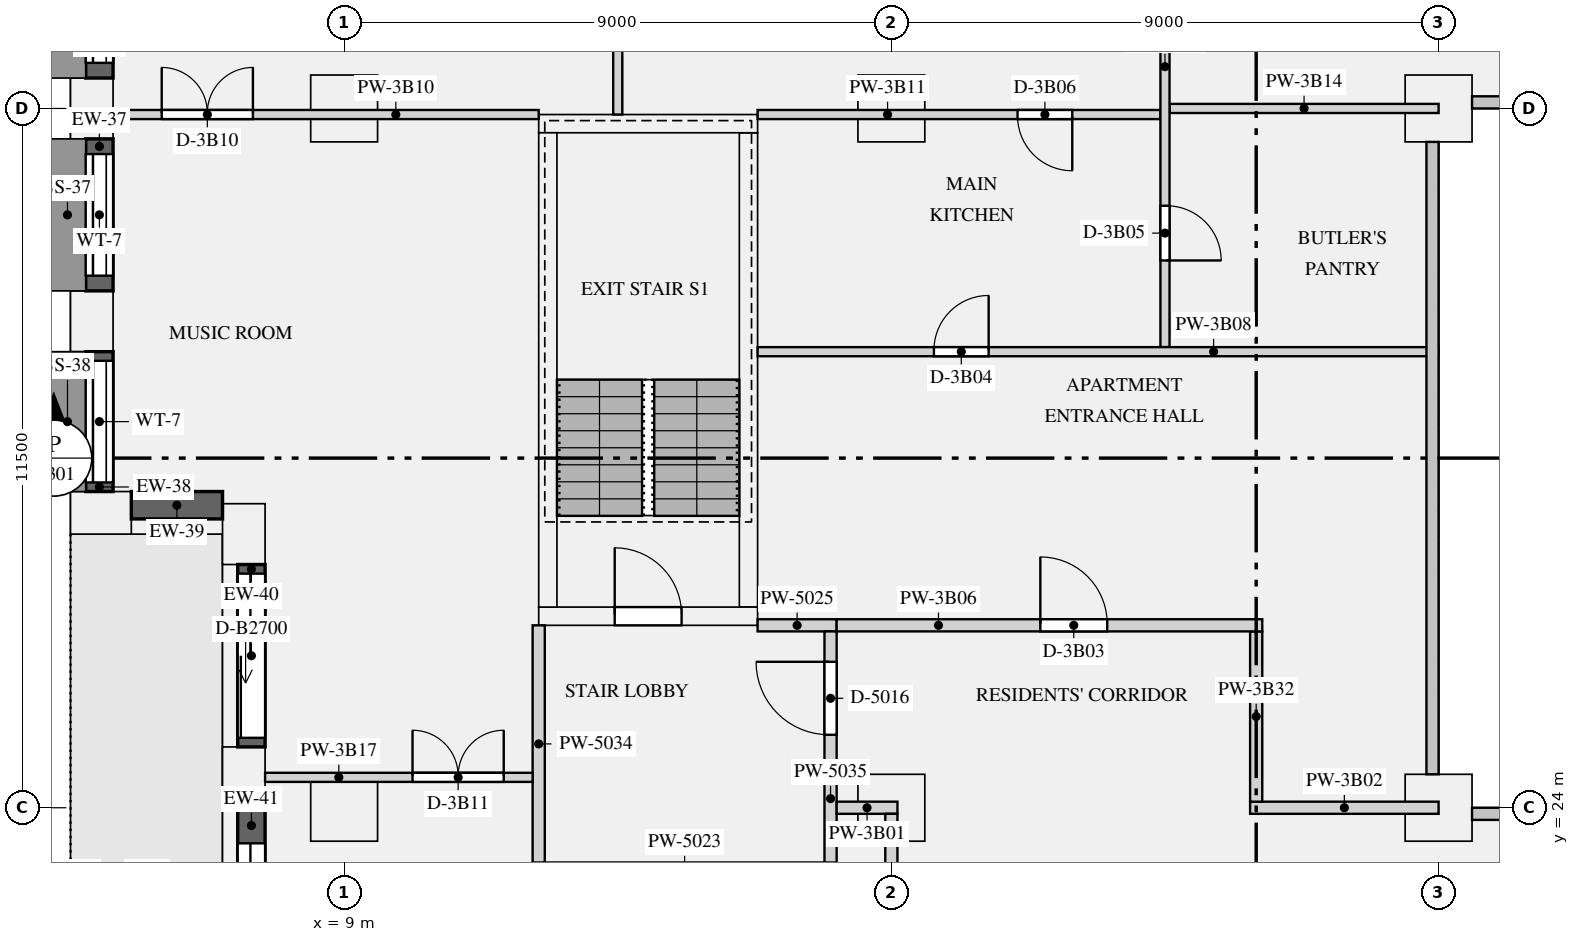
"""IFC4 building model, lengths in metres.
Left out: names, types, materials, properties, quantities, classifications, styles, units other than length and angle.
Written with IfcOpenShell. Run it as: python <this file> out.ifc"""

import sys

from ifc_helpers import new_model, si_unit, direction, frame, frame_2d, origin, origin_2d, place, context, subcontext, project, spatial, rectangle, extrude, element, fill, save


model = new_model("IFC4")
c1 = context("Model", 3, precision=1e-05, world=origin(), true_north=direction((0.0, 1.0)))
c2 = subcontext(c1, "Body", "Model", "MODEL_VIEW")
j1 = project(units=[si_unit("LENGTHUNIT", "METRE"), si_unit("PLANEANGLEUNIT", "RADIAN")], contexts=[c1])
p1 = place(None, origin())
s1 = spatial("IfcSite", under=j1, at=p1, CompositionType="ELEMENT")
p2 = place(p1, origin())
s2 = spatial("IfcBuilding", under=s1, at=p2, CompositionType="ELEMENT")
p3 = place(p2, frame((0.0, 0.0, 150.75)))
s3 = spatial("IfcBuildingStorey", under=s2, at=p3, CompositionType="ELEMENT", Elevation=150.75)
for number, where, z_axis, x_axis in (
    (1, (4.85, 35.5, 0.0), (0.0, 0.0, 1.0), (0.0, -1.0, 0.0)),
    (2, (4.85, 32.0, 0.0), (0.0, 0.0, 1.0), (0.0, -1.0, 0.0)),
    (3, (5.0, 28.85, 0.0), (0.0, 0.0, 1.0), (1.0, 0.0, 0.0)),
    (4, (7.35, 28.5, 0.0), (0.0, 0.0, 1.0), (0.0, -1.0, 0.0)),
    (5, (7.35, 24.5, 0.0), (0.0, 0.0, 1.0), (0.0, -1.0, 0.0)),
):
    element("IfcColumn", number, at=place(p3, frame(where, z_axis=z_axis, x_axis=x_axis)), inside=s3, PredefinedType="USERDEFINED", context=c2, shape_type="SweptSolid", body=[
        extrude(rectangle(XDim=1.0, YDim=0.7, at=origin_2d()), origin(), (0.0, 0.0, 1.0), 3.15),
    ])
for number, where, z_axis, x_axis in (
    (6, (9.0, 24.0, 0.0), (0.0, 0.0, 1.0), (1.0, 0.0, 0.0)),
    (7, (18.0, 24.0, 0.0), (0.0, 0.0, 1.0), (1.0, 0.0, 0.0)),
    (8, (27.0, 24.0, 0.0), (0.0, 0.0, 1.0), (1.0, 0.0, 0.0)),
    (9, (9.0, 35.5, 0.0), (0.0, 0.0, 1.0), (1.0, 0.0, 0.0)),
    (10, (18.0, 35.5, 0.0), (0.0, 0.0, 1.0), (1.0, 0.0, 0.0)),
    (11, (27.0, 35.5, 0.0), (0.0, 0.0, 1.0), (1.0, 0.0, 0.0)),
):
    element("IfcColumn", number, at=place(p3, frame(where, z_axis=z_axis, x_axis=x_axis)), inside=s3, PredefinedType="COLUMN", context=c2, shape_type="SweptSolid", body=[
        extrude(rectangle(XDim=1.1, YDim=1.1, at=origin_2d()), origin(), (0.0, 0.0, 1.0), 3.15),
    ])
p4 = place(p3, frame((12.2, 27.15, 0.0), z_axis=(0.0, 0.0, 1.0), x_axis=(1.0, 0.0, 0.0)))
e12 = element("IfcWall", 12, at=p4, inside=s3, PredefinedType="SHEAR", context=c2, shape_type="SweptSolid", body=[
    extrude(rectangle(XDim=3.6, YDim=0.3, at=frame_2d((1.8, 0.0))), origin(), (0.0, 0.0, 1.0), 3.15),
])
p5 = place(p4, frame((1.25, 0.0, 0.0)))
e13 = element("IfcOpeningElement", 13, at=p5, cuts=e12, PredefinedType="OPENING", context=c2, shape_type="SweptSolid", body=[
    extrude(rectangle(XDim=1.1, YDim=2.1, at=frame_2d((0.55, 1.05))), frame((0.0, 0.16, 0.0), z_axis=(0.0, -1.0, 0.0), x_axis=(1.0, 0.0, 0.0)), (0.0, 0.0, 1.0), 0.32),
])
p6 = place(p3, frame((12.2, 35.25, 0.0), z_axis=(0.0, 0.0, 1.0), x_axis=(1.0, 0.0, 0.0)))
e14 = element("IfcWall", 14, at=p6, inside=s3, PredefinedType="SHEAR", context=c2, shape_type="SweptSolid", body=[
    extrude(rectangle(XDim=3.6, YDim=0.3, at=frame_2d((1.8, 0.0))), origin(), (0.0, 0.0, 1.0), 3.15),
])
for number, where, z_axis, x_axis in (
    (15, (12.35, 27.3, 0.0), (0.0, 0.0, 1.0), (0.0, 1.0, 0.0)),
    (16, (15.65, 27.3, 0.0), (0.0, 0.0, 1.0), (0.0, 1.0, 0.0)),
):
    element("IfcWall", number, at=place(p3, frame(where, z_axis=z_axis, x_axis=x_axis)), inside=s3, PredefinedType="SHEAR", context=c2, shape_type="SweptSolid", body=[
        extrude(rectangle(XDim=7.8, YDim=0.3, at=frame_2d((3.9, 0.0))), origin(), (0.0, 0.0, 1.0), 3.15),
    ])
p7 = place(p3, frame((4.975, 38.0, 0.9), z_axis=(0.0, 0.0, 1.0), x_axis=(0.0, -1.0, 0.0)))
e17 = element("IfcWall", 17, at=p7, inside=s3, PredefinedType="SOLIDWALL", context=c2, shape_type="SweptSolid", body=[
    extrude(rectangle(XDim=2.0, YDim=0.45, at=frame_2d((1.0, 0.0))), origin(), (0.0, 0.0, 1.0), 1.93),
])
p8 = place(p7, frame((0.25, 0.0, 0.15)))
e18 = element("IfcOpeningElement", 18, at=p8, cuts=e17, PredefinedType="OPENING", context=c2, shape_type="SweptSolid", body=[
    extrude(rectangle(XDim=1.5, YDim=1.5, at=frame_2d((0.75, 0.75))), frame((0.0, 0.235, 0.0), z_axis=(0.0, -1.0, 0.0), x_axis=(1.0, 0.0, 0.0)), (0.0, 0.0, 1.0), 0.47),
])
p9 = place(p3, frame((4.975, 35.0, 0.9), z_axis=(0.0, 0.0, 1.0), x_axis=(0.0, -1.0, 0.0)))
e19 = element("IfcWall", 19, at=p9, inside=s3, PredefinedType="SOLIDWALL", context=c2, shape_type="SweptSolid", body=[
    extrude(rectangle(XDim=2.5, YDim=0.45, at=frame_2d((1.25, 0.0))), origin(), (0.0, 0.0, 1.0), 1.93),
])
p10 = place(p9, frame((0.25, 0.0, 0.15)))
e20 = element("IfcOpeningElement", 20, at=p10, cuts=e19, PredefinedType="OPENING", context=c2, shape_type="SweptSolid", body=[
    extrude(rectangle(XDim=2.0, YDim=1.5, at=frame_2d((1.0, 0.75))), frame((0.0, 0.235, 0.0), z_axis=(0.0, -1.0, 0.0), x_axis=(1.0, 0.0, 0.0)), (0.0, 0.0, 1.0), 0.47),
])
p11 = place(p3, frame((4.975, 31.5, 0.9), z_axis=(0.0, 0.0, 1.0), x_axis=(0.0, -1.0, 0.0)))
e21 = element("IfcWall", 21, at=p11, inside=s3, PredefinedType="SOLIDWALL", context=c2, shape_type="SweptSolid", body=[
    extrude(rectangle(XDim=2.3, YDim=0.45, at=frame_2d((1.15, 0.0))), origin(), (0.0, 0.0, 1.0), 1.93),
])
p12 = place(p11, frame((0.15, 0.0, 0.15)))
e22 = element("IfcOpeningElement", 22, at=p12, cuts=e21, PredefinedType="OPENING", context=c2, shape_type="SweptSolid", body=[
    extrude(rectangle(XDim=2.0, YDim=1.5, at=frame_2d((1.0, 0.75))), frame((0.0, 0.235, 0.0), z_axis=(0.0, -1.0, 0.0), x_axis=(1.0, 0.0, 0.0)), (0.0, 0.0, 1.0), 0.47),
])
p13 = place(p3, frame((5.5, 28.975, 0.9), z_axis=(0.0, 0.0, 1.0), x_axis=(1.0, 0.0, 0.0)))
e23 = element("IfcWall", 23, at=p13, inside=s3, PredefinedType="SOLIDWALL", context=c2, shape_type="SweptSolid", body=[
    extrude(rectangle(XDim=1.5, YDim=0.45, at=frame_2d((0.75, 0.0))), origin(), (0.0, 0.0, 1.0), 1.93),
])
p14 = place(p3, frame((7.475, 28.0, 0.0), z_axis=(0.0, 0.0, 1.0), x_axis=(0.0, -1.0, 0.0)))
e24 = element("IfcWall", 24, at=p14, inside=s3, PredefinedType="SOLIDWALL", context=c2, shape_type="SweptSolid", body=[
    extrude(rectangle(XDim=3.0, YDim=0.45, at=frame_2d((1.5, 0.0))), origin(), (0.0, 0.0, 1.0), 2.83),
])
p15 = place(p14, frame((0.15, 0.0, 0.0)))
e25 = element("IfcOpeningElement", 25, at=p15, cuts=e24, PredefinedType="OPENING", context=c2, shape_type="SweptSolid", body=[
    extrude(rectangle(XDim=2.7, YDim=2.3, at=frame_2d((1.35, 1.15))), frame((0.0, 0.235, 0.0), z_axis=(0.0, -1.0, 0.0), x_axis=(1.0, 0.0, 0.0)), (0.0, 0.0, 1.0), 0.47),
])
p16 = place(p3, frame((7.475, 24.0, 0.0), z_axis=(0.0, 0.0, 1.0), x_axis=(0.0, -1.0, 0.0)))
e26 = element("IfcWall", 26, at=p16, inside=s3, PredefinedType="SOLIDWALL", context=c2, shape_type="SweptSolid", body=[
    extrude(rectangle(XDim=3.0, YDim=0.45, at=frame_2d((1.5, 0.0))), origin(), (0.0, 0.0, 1.0), 2.83),
])
p17 = place(p16, frame((0.585, 0.0, 0.0)))
e27 = element("IfcOpeningElement", 27, at=p17, cuts=e26, PredefinedType="OPENING", context=c2, shape_type="SweptSolid", body=[
    extrude(rectangle(XDim=2.25, YDim=2.3, at=frame_2d((1.125, 1.15))), frame((0.0, 0.235, 0.0), z_axis=(0.0, -1.0, 0.0), x_axis=(1.0, 0.0, 0.0)), (0.0, 0.0, 1.0), 0.47),
])
p18 = place(p3, frame((15.8, 27.0, 0.0), z_axis=(0.0, 0.0, 1.0), x_axis=(1.0, 0.0, 0.0)))
e28 = element("IfcWall", 28, at=p18, inside=s3, PredefinedType="PARTITIONING", context=c2, shape_type="SweptSolid", body=[
    extrude(rectangle(XDim=1.3, YDim=0.2, at=frame_2d((0.65, 0.0))), origin(), (0.0, 0.0, 1.0), 2.83),
])
p19 = place(p3, frame((12.2, 23.1, 0.0), z_axis=(0.0, 0.0, 1.0), x_axis=(0.0, 1.0, 0.0)))
e29 = element("IfcWall", 29, at=p19, inside=s3, PredefinedType="PARTITIONING", context=c2, shape_type="SweptSolid", body=[
    extrude(rectangle(XDim=3.9, YDim=0.2, at=frame_2d((1.95, 0.0))), origin(), (0.0, 0.0, 1.0), 2.83),
])
p20 = place(p3, frame((17.0, 23.1, 0.0), z_axis=(0.0, 0.0, 1.0), x_axis=(0.0, 1.0, 0.0)))
e30 = element("IfcWall", 30, at=p20, inside=s3, PredefinedType="PARTITIONING", context=c2, shape_type="SweptSolid", body=[
    extrude(rectangle(XDim=3.8, YDim=0.2, at=frame_2d((1.9, 0.0))), origin(), (0.0, 0.0, 1.0), 2.83),
])
p21 = place(p20, frame((2.1, 0.0, 0.0)))
e31 = element("IfcOpeningElement", 31, at=p21, cuts=e30, PredefinedType="OPENING", context=c2, shape_type="SweptSolid", body=[
    extrude(rectangle(XDim=1.2, YDim=2.1, at=frame_2d((0.6, 1.05))), frame((0.0, 0.11, 0.0), z_axis=(0.0, -1.0, 0.0), x_axis=(1.0, 0.0, 0.0)), (0.0, 0.0, 1.0), 0.22),
])
p22 = place(p3, frame((17.1, 24.0, 0.0), z_axis=(0.0, 0.0, 1.0), x_axis=(1.0, 0.0, 0.0)))
e32 = element("IfcWall", 32, at=p22, inside=s3, PredefinedType="PARTITIONING", context=c2, shape_type="SweptSolid", body=[
    extrude(rectangle(XDim=1.0, YDim=0.2, at=frame_2d((0.5, 0.0))), origin(), (0.0, 0.0, 1.0), 2.83),
])
p23 = place(p3, frame((23.9, 24.0, 0.0), z_axis=(0.0, 0.0, 1.0), x_axis=(1.0, 0.0, 0.0)))
e33 = element("IfcWall", 33, at=p23, inside=s3, PredefinedType="PARTITIONING", context=c2, shape_type="SweptSolid", body=[
    extrude(rectangle(XDim=3.1, YDim=0.2, at=frame_2d((1.55, 0.0))), origin(), (0.0, 0.0, 1.0), 2.83),
])
p24 = place(p3, frame((17.1, 27.0, 0.0), z_axis=(0.0, 0.0, 1.0), x_axis=(1.0, 0.0, 0.0)))
e34 = element("IfcWall", 34, at=p24, inside=s3, PredefinedType="PARTITIONING", context=c2, shape_type="SweptSolid", body=[
    extrude(rectangle(XDim=7.0, YDim=0.2, at=frame_2d((3.5, 0.0))), origin(), (0.0, 0.0, 1.0), 2.83),
])
p25 = place(p24, frame((3.35, 0.0, 0.0)))
e35 = element("IfcOpeningElement", 35, at=p25, cuts=e34, PredefinedType="OPENING", context=c2, shape_type="SweptSolid", body=[
    extrude(rectangle(XDim=1.1, YDim=2.1, at=frame_2d((0.55, 1.05))), frame((0.0, 0.11, 0.0), z_axis=(0.0, -1.0, 0.0), x_axis=(1.0, 0.0, 0.0)), (0.0, 0.0, 1.0), 0.22),
])
p26 = place(p3, frame((15.8, 31.5, 0.0), z_axis=(0.0, 0.0, 1.0), x_axis=(1.0, 0.0, 0.0)))
e36 = element("IfcWall", 36, at=p26, inside=s3, PredefinedType="PARTITIONING", context=c2, shape_type="SweptSolid", body=[
    extrude(rectangle(XDim=11.2, YDim=0.15, at=frame_2d((5.6, 0.0))), origin(), (0.0, 0.0, 1.0), 2.83),
])
p27 = place(p26, frame((2.9, 0.0, 0.0)))
e37 = element("IfcOpeningElement", 37, at=p27, cuts=e36, PredefinedType="OPENING", context=c2, shape_type="SweptSolid", body=[
    extrude(rectangle(XDim=0.9, YDim=2.1, at=frame_2d((0.45, 1.05))), frame((0.0, 0.085, 0.0), z_axis=(0.0, -1.0, 0.0), x_axis=(1.0, 0.0, 0.0)), (0.0, 0.0, 1.0), 0.17),
])
p28 = place(p3, frame((5.2, 35.4, 0.0), z_axis=(0.0, 0.0, 1.0), x_axis=(1.0, 0.0, 0.0)))
e38 = element("IfcWall", 38, at=p28, inside=s3, PredefinedType="PARTITIONING", context=c2, shape_type="SweptSolid", body=[
    extrude(rectangle(XDim=7.0, YDim=0.15, at=frame_2d((3.5, 0.0))), origin(), (0.0, 0.0, 1.0), 2.83),
])
p29 = place(p28, frame((0.8, 0.0, 0.0)))
e39 = element("IfcOpeningElement", 39, at=p29, cuts=e38, PredefinedType="OPENING", context=c2, shape_type="SweptSolid", body=[
    extrude(rectangle(XDim=1.5, YDim=2.1, at=frame_2d((0.75, 1.05))), frame((0.0, 0.085, 0.0), z_axis=(0.0, -1.0, 0.0), x_axis=(1.0, 0.0, 0.0)), (0.0, 0.0, 1.0), 0.17),
])
p30 = place(p3, frame((15.8, 35.4, 0.0), z_axis=(0.0, 0.0, 1.0), x_axis=(1.0, 0.0, 0.0)))
e40 = element("IfcWall", 40, at=p30, inside=s3, PredefinedType="PARTITIONING", context=c2, shape_type="SweptSolid", body=[
    extrude(rectangle(XDim=6.625, YDim=0.15, at=frame_2d((3.312, 0.0))), origin(), (0.0, 0.0, 1.0), 2.83),
])
p31 = place(p30, frame((4.275, 0.0, 0.0)))
e41 = element("IfcOpeningElement", 41, at=p31, cuts=e40, PredefinedType="OPENING", context=c2, shape_type="SweptSolid", body=[
    extrude(rectangle(XDim=0.9, YDim=2.1, at=frame_2d((0.45, 1.05))), frame((0.0, 0.085, 0.0), z_axis=(0.0, -1.0, 0.0), x_axis=(1.0, 0.0, 0.0)), (0.0, 0.0, 1.0), 0.17),
])
p32 = place(p3, frame((22.575, 35.5, 0.0), z_axis=(0.0, 0.0, 1.0), x_axis=(1.0, 0.0, 0.0)))
e42 = element("IfcWall", 42, at=p32, inside=s3, PredefinedType="PARTITIONING", context=c2, shape_type="SweptSolid", body=[
    extrude(rectangle(XDim=4.425, YDim=0.15, at=frame_2d((2.212, 0.0))), origin(), (0.0, 0.0, 1.0), 2.83),
])
p33 = place(p3, frame((7.7, 24.5, 0.0), z_axis=(0.0, 0.0, 1.0), x_axis=(1.0, 0.0, 0.0)))
e43 = element("IfcWall", 43, at=p33, inside=s3, PredefinedType="PARTITIONING", context=c2, shape_type="SweptSolid", body=[
    extrude(rectangle(XDim=4.4, YDim=0.15, at=frame_2d((2.2, 0.0))), origin(), (0.0, 0.0, 1.0), 2.83),
])
p34 = place(p33, frame((2.425, 0.0, 0.0)))
e44 = element("IfcOpeningElement", 44, at=p34, cuts=e43, PredefinedType="OPENING", context=c2, shape_type="SweptSolid", body=[
    extrude(rectangle(XDim=1.5, YDim=2.1, at=frame_2d((0.75, 1.05))), frame((0.0, 0.085, 0.0), z_axis=(0.0, -1.0, 0.0), x_axis=(1.0, 0.0, 0.0)), (0.0, 0.0, 1.0), 0.17),
])
p35 = place(p3, frame((18.0, 16.1, 0.0), z_axis=(0.0, 0.0, 1.0), x_axis=(0.0, 1.0, 0.0)))
e45 = element("IfcWall", 45, at=p35, inside=s3, PredefinedType="PARTITIONING", context=c2, shape_type="SweptSolid", body=[
    extrude(rectangle(XDim=7.8, YDim=0.2, at=frame_2d((3.9, 0.0))), origin(), (0.0, 0.0, 1.0), 2.83),
])
p36 = place(p3, frame((24.0, 24.1, 0.0), z_axis=(0.0, 0.0, 1.0), x_axis=(0.0, 1.0, 0.0)))
e46 = element("IfcWall", 46, at=p36, inside=s3, PredefinedType="PARTITIONING", context=c2, shape_type="SweptSolid", body=[
    extrude(rectangle(XDim=2.8, YDim=0.2, at=frame_2d((1.4, 0.0))), origin(), (0.0, 0.0, 1.0), 2.83),
])
p37 = place(p3, frame((22.5, 31.575, 0.0), z_axis=(0.0, 0.0, 1.0), x_axis=(0.0, 1.0, 0.0)))
e47 = element("IfcWall", 47, at=p37, inside=s3, PredefinedType="PARTITIONING", context=c2, shape_type="SweptSolid", body=[
    extrude(rectangle(XDim=11.225, YDim=0.15, at=frame_2d((5.613, 0.0))), origin(), (0.0, 0.0, 1.0), 2.83),
])
p38 = place(p37, frame((1.425, 0.0, 0.0)))
e48 = element("IfcOpeningElement", 48, at=p38, cuts=e47, PredefinedType="OPENING", context=c2, shape_type="SweptSolid", body=[
    extrude(rectangle(XDim=0.9, YDim=2.1, at=frame_2d((0.45, 1.05))), frame((0.0, 0.085, 0.0), z_axis=(0.0, -1.0, 0.0), x_axis=(1.0, 0.0, 0.0)), (0.0, 0.0, 1.0), 0.17),
])
p39 = place(p37, frame((6.9, 0.0, 0.0)))
e49 = element("IfcOpeningElement", 49, at=p39, cuts=e47, PredefinedType="OPENING", context=c2, shape_type="SweptSolid", body=[
    extrude(rectangle(XDim=1.5, YDim=2.1, at=frame_2d((0.75, 1.05))), frame((0.0, 0.085, 0.0), z_axis=(0.0, -1.0, 0.0), x_axis=(1.0, 0.0, 0.0)), (0.0, 0.0, 1.0), 0.17),
])
p40 = place(p3, frame((13.5, 35.4, 0.0), z_axis=(0.0, 0.0, 1.0), x_axis=(0.0, 1.0, 0.0)))
e50 = element("IfcWall", 50, at=p40, inside=s3, PredefinedType="PARTITIONING", context=c2, shape_type="SweptSolid", body=[
    extrude(rectangle(XDim=7.4, YDim=0.15, at=frame_2d((3.7, 0.0))), origin(), (0.0, 0.0, 1.0), 2.83),
])
p41 = place(p40, frame((3.025, 0.0, 0.0)))
e51 = element("IfcOpeningElement", 51, at=p41, cuts=e50, PredefinedType="OPENING", context=c2, shape_type="SweptSolid", body=[
    extrude(rectangle(XDim=1.5, YDim=2.1, at=frame_2d((0.75, 1.05))), frame((0.0, 0.085, 0.0), z_axis=(0.0, -1.0, 0.0), x_axis=(1.0, 0.0, 0.0)), (0.0, 0.0, 1.0), 0.17),
])
p42 = place(p8, origin())
e52 = element("IfcWindow", 52, at=p42, inside=s3, PartitioningType="SINGLE_PANEL", PredefinedType="WINDOW", context=c2, shape_type="SweptSolid", body=[
    extrude(rectangle(XDim=1.5, YDim=1.5, at=frame_2d((0.75, 0.75))), frame((0.0, -0.065, 0.0), z_axis=(0.0, -1.0, 0.0), x_axis=(1.0, 0.0, 0.0)), (0.0, 0.0, 1.0), 0.06),
])
fill(e18, e52)
p43 = place(p10, origin())
e53 = element("IfcWindow", 53, at=p43, inside=s3, PartitioningType="SINGLE_PANEL", PredefinedType="WINDOW", context=c2, shape_type="SweptSolid", body=[
    extrude(rectangle(XDim=2.0, YDim=1.5, at=frame_2d((1.0, 0.75))), frame((0.0, -0.065, 0.0), z_axis=(0.0, -1.0, 0.0), x_axis=(1.0, 0.0, 0.0)), (0.0, 0.0, 1.0), 0.06),
])
fill(e20, e53)
p44 = place(p12, origin())
e54 = element("IfcWindow", 54, at=p44, inside=s3, PartitioningType="SINGLE_PANEL", PredefinedType="WINDOW", context=c2, shape_type="SweptSolid", body=[
    extrude(rectangle(XDim=2.0, YDim=1.5, at=frame_2d((1.0, 0.75))), frame((0.0, -0.065, 0.0), z_axis=(0.0, -1.0, 0.0), x_axis=(1.0, 0.0, 0.0)), (0.0, 0.0, 1.0), 0.06),
])
fill(e22, e54)
p45 = place(p15, origin())
e55 = element("IfcDoor", 55, at=p45, inside=s3, OperationType="SLIDING_TO_LEFT", PredefinedType="DOOR", context=c2, shape_type="SweptSolid", body=[
    extrude(rectangle(XDim=2.7, YDim=2.3, at=frame_2d((1.35, 1.15))), frame((0.0, -0.07, 0.0), z_axis=(0.0, -1.0, 0.0), x_axis=(1.0, 0.0, 0.0)), (0.0, 0.0, 1.0), 0.05),
])
fill(e25, e55)
p46 = place(p17, origin())
e56 = element("IfcDoor", 56, at=p46, inside=s3, OperationType="SLIDING_TO_LEFT", PredefinedType="DOOR", context=c2, shape_type="SweptSolid", body=[
    extrude(rectangle(XDim=2.25, YDim=2.3, at=frame_2d((1.125, 1.15))), frame((0.0, -0.07, 0.0), z_axis=(0.0, -1.0, 0.0), x_axis=(1.0, 0.0, 0.0)), (0.0, 0.0, 1.0), 0.05),
])
fill(e27, e56)
p47 = place(p5, origin())
e57 = element("IfcDoor", 57, at=p47, inside=s3, OperationType="SINGLE_SWING_LEFT", PredefinedType="DOOR", context=c2, shape_type="SweptSolid", body=[
    extrude(rectangle(XDim=1.1, YDim=2.1, at=frame_2d((0.55, 1.05))), frame((0.0, 0.025, 0.0), z_axis=(0.0, -1.0, 0.0), x_axis=(1.0, 0.0, 0.0)), (0.0, 0.0, 1.0), 0.05),
])
fill(e13, e57)
p48 = place(p21, origin())
e58 = element("IfcDoor", 58, at=p48, inside=s3, OperationType="SINGLE_SWING_RIGHT", PredefinedType="DOOR", context=c2, shape_type="SweptSolid", body=[
    extrude(rectangle(XDim=1.2, YDim=2.1, at=frame_2d((0.6, 1.05))), frame((0.0, 0.025, 0.0), z_axis=(0.0, -1.0, 0.0), x_axis=(1.0, 0.0, 0.0)), (0.0, 0.0, 1.0), 0.05),
])
fill(e31, e58)
p49 = place(p25, origin())
e59 = element("IfcDoor", 59, at=p49, inside=s3, OperationType="SINGLE_SWING_LEFT", PredefinedType="DOOR", context=c2, shape_type="SweptSolid", body=[
    extrude(rectangle(XDim=1.1, YDim=2.1, at=frame_2d((0.55, 1.05))), frame((0.0, 0.025, 0.0), z_axis=(0.0, -1.0, 0.0), x_axis=(1.0, 0.0, 0.0)), (0.0, 0.0, 1.0), 0.05),
])
fill(e35, e59)
p50 = place(p27, origin())
e60 = element("IfcDoor", 60, at=p50, inside=s3, OperationType="SINGLE_SWING_RIGHT", PredefinedType="DOOR", context=c2, shape_type="SweptSolid", body=[
    extrude(rectangle(XDim=0.9, YDim=2.1, at=frame_2d((0.45, 1.05))), frame((0.0, 0.025, 0.0), z_axis=(0.0, -1.0, 0.0), x_axis=(1.0, 0.0, 0.0)), (0.0, 0.0, 1.0), 0.05),
])
fill(e37, e60)
p51 = place(p38, frame((0.9, 0.0, 0.0), z_axis=(0.0, 0.0, 1.0), x_axis=(-1.0, 0.0, 0.0)))
e61 = element("IfcDoor", 61, at=p51, inside=s3, OperationType="SINGLE_SWING_RIGHT", PredefinedType="DOOR", context=c2, shape_type="SweptSolid", body=[
    extrude(rectangle(XDim=0.9, YDim=2.1, at=frame_2d((0.45, 1.05))), frame((0.0, 0.025, 0.0), z_axis=(0.0, -1.0, 0.0), x_axis=(1.0, 0.0, 0.0)), (0.0, 0.0, 1.0), 0.05),
])
fill(e48, e61)
p52 = place(p31, frame((0.9, 0.0, 0.0), z_axis=(0.0, 0.0, 1.0), x_axis=(-1.0, 0.0, 0.0)))
e62 = element("IfcDoor", 62, at=p52, inside=s3, OperationType="SINGLE_SWING_LEFT", PredefinedType="DOOR", context=c2, shape_type="SweptSolid", body=[
    extrude(rectangle(XDim=0.9, YDim=2.1, at=frame_2d((0.45, 1.05))), frame((0.0, 0.025, 0.0), z_axis=(0.0, -1.0, 0.0), x_axis=(1.0, 0.0, 0.0)), (0.0, 0.0, 1.0), 0.05),
])
fill(e41, e62)
p53 = place(p29, origin())
e63 = element("IfcDoor", 63, at=p53, inside=s3, OperationType="DOUBLE_DOOR_SINGLE_SWING", PredefinedType="DOOR", context=c2, shape_type="SweptSolid", body=[
    extrude(rectangle(XDim=1.5, YDim=2.1, at=frame_2d((0.75, 1.05))), frame((0.0, 0.025, 0.0), z_axis=(0.0, -1.0, 0.0), x_axis=(1.0, 0.0, 0.0)), (0.0, 0.0, 1.0), 0.05),
])
fill(e39, e63)
p54 = place(p34, origin())
e64 = element("IfcDoor", 64, at=p54, inside=s3, OperationType="DOUBLE_DOOR_SINGLE_SWING", PredefinedType="DOOR", context=c2, shape_type="SweptSolid", body=[
    extrude(rectangle(XDim=1.5, YDim=2.1, at=frame_2d((0.75, 1.05))), frame((0.0, 0.025, 0.0), z_axis=(0.0, -1.0, 0.0), x_axis=(1.0, 0.0, 0.0)), (0.0, 0.0, 1.0), 0.05),
])
fill(e44, e64)
save(model, sys.argv[1])
